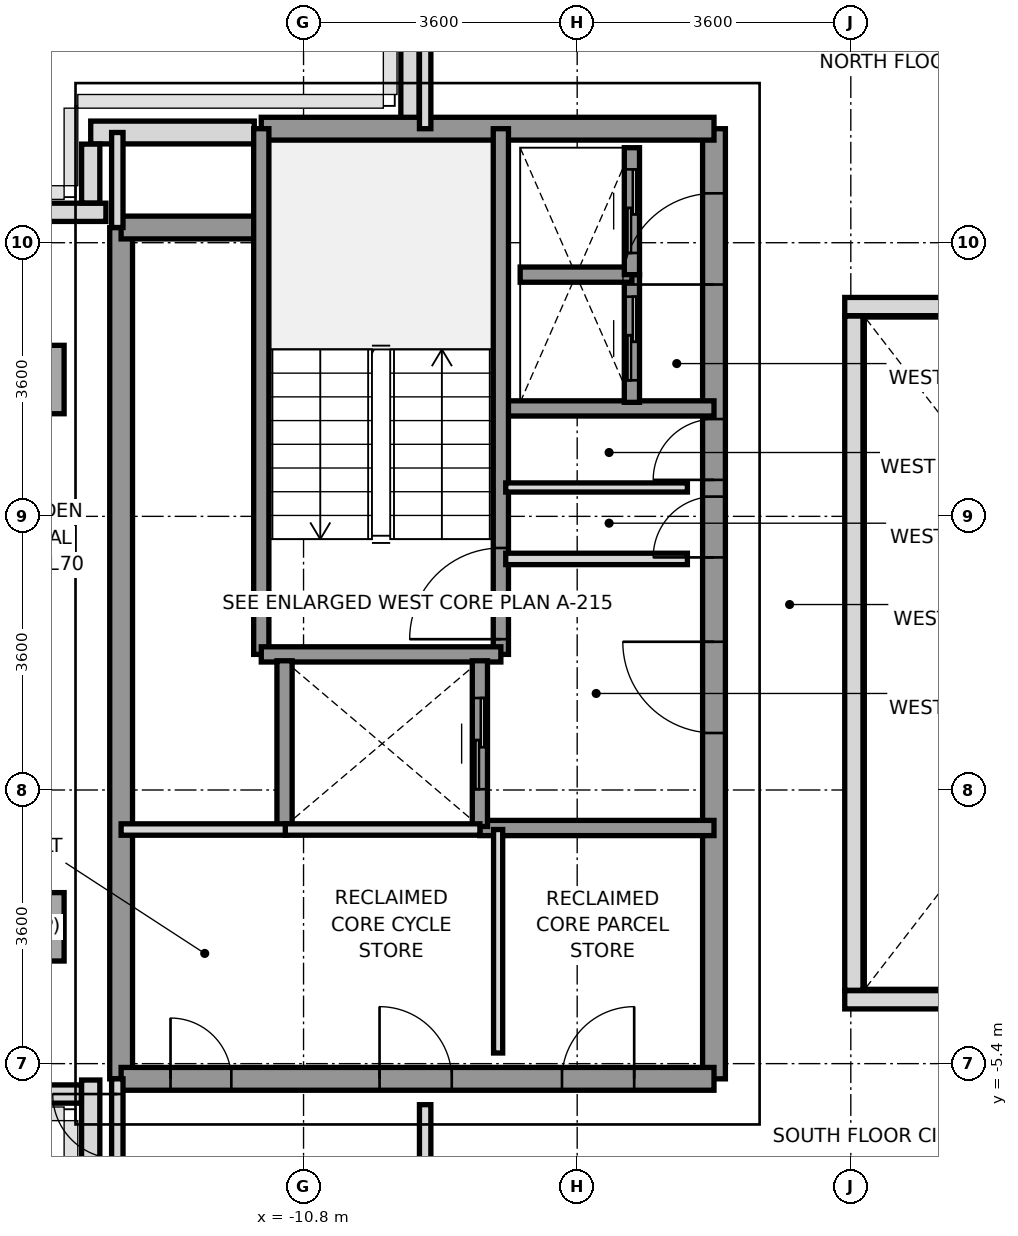
"""IFC4 building model, lengths in metres.
Left out: names, types, materials, properties, quantities, classifications, styles, units other than length and angle.
Written with IfcOpenShell. Run it as: python <this file> out.ifc"""

import sys

from ifc_helpers import new_model, si_unit, direction, frame, frame_2d, origin, origin_2d, place, context, subcontext, project, spatial, rectangle, extrude, source, transform, mapped, element, fill, save


model = new_model("IFC4")
c1 = context("Model", 3, precision=1e-05, world=origin(), true_north=direction((0.0, 1.0)))
c2 = subcontext(c1, "Body", "Model", "MODEL_VIEW")
j1 = project(units=[si_unit("LENGTHUNIT", "METRE"), si_unit("PLANEANGLEUNIT", "RADIAN")], contexts=[c1])
p1 = place(None, origin())
s1 = spatial("IfcSite", under=j1, at=p1, CompositionType="ELEMENT")
p2 = place(p1, origin())
s2 = spatial("IfcBuilding", under=s1, at=p2, CompositionType="ELEMENT")
p3 = place(p2, frame((0.0, 0.0, 252.4)))
s3 = spatial("IfcBuildingStorey", under=s2, at=p3, CompositionType="ELEMENT", Elevation=252.4)
m1 = source(origin(), c2, "Body", "SweptSolid", [
    extrude(rectangle(XDim=0.9, YDim=0.9, at=origin_2d()), origin(), (0.0, 0.0, 1.0), 3.01),
])
for number, where, z_axis, x_axis in (
    (1, (-14.4, -3.6, 0.0), (0.0, 0.0, 1.0), (1.0, 0.0, 0.0)),
    (2, (-14.4, 3.6, 0.0), (0.0, 0.0, 1.0), (1.0, 0.0, 0.0)),
):
    element("IfcColumn", number, at=place(p3, frame(where, z_axis=z_axis, x_axis=x_axis)), inside=s3, PredefinedType="COLUMN", context=c2, shape_type="MappedRepresentation", body=[
        mapped(m1, transform((0.0, 0.0, 0.0), x_axis=(1.0, 0.0, 0.0), y_axis=(0.0, 1.0, 0.0), z_axis=(0.0, 0.0, 1.0), scale=1.0)),
    ])
p4 = place(p3, frame((-13.6, 6.85, 0.0), z_axis=(0.0, 0.0, 1.0), x_axis=(1.0, 0.0, 0.0)))
e3 = element("IfcWall", 3, at=p4, inside=s3, PredefinedType="SOLIDWALL", context=c2, shape_type="SweptSolid", body=[
    extrude(rectangle(XDim=2.152, YDim=0.3, at=frame_2d((1.076, 0.0))), origin(), (0.0, 0.0, 1.0), 3.01),
])
p5 = place(p3, frame((-13.6, -6.877, 0.0), z_axis=(0.0, 0.0, 1.0), x_axis=(0.0, 1.0, 0.0)))
e4 = element("IfcWall", 4, at=p5, inside=s3, PredefinedType="PARAPET", context=c2, shape_type="SweptSolid", body=[
    extrude(rectangle(XDim=1.261, YDim=0.24, at=frame_2d((0.631, 0.0))), origin(), (0.0, 0.0, 1.0), 1.15),
])
p6 = place(p3, frame((-13.723, -5.8, 0.0), z_axis=(0.0, 0.0, 1.0), x_axis=(-1.0, 0.0, 0.0)))
e5 = element("IfcWall", 5, at=p6, inside=s3, PredefinedType="PARAPET", context=c2, shape_type="SweptSolid", body=[
    extrude(rectangle(XDim=1.077, YDim=0.24, at=frame_2d((0.539, 0.0))), origin(), (0.0, 0.0, 1.0), 1.15),
])
p7 = place(p3, frame((-14.677, 5.8, 0.0), z_axis=(0.0, 0.0, 1.0), x_axis=(1.0, 0.0, 0.0)))
e6 = element("IfcWall", 6, at=p7, inside=s3, PredefinedType="PARAPET", context=c2, shape_type="SweptSolid", body=[
    extrude(rectangle(XDim=1.277, YDim=0.24, at=frame_2d((0.639, 0.0))), origin(), (0.0, 0.0, 1.0), 1.15),
])
p8 = place(p3, frame((-13.6, 5.923, 0.0), z_axis=(0.0, 0.0, 1.0), x_axis=(0.0, 1.0, 0.0)))
e7 = element("IfcWall", 7, at=p8, inside=s3, PredefinedType="PARAPET", context=c2, shape_type="SweptSolid", body=[
    extrude(rectangle(XDim=0.774, YDim=0.24, at=frame_2d((0.387, 0.0))), origin(), (0.0, 0.0, 1.0), 1.15),
])
p9 = place(p3, frame((-9.4, 6.953, 0.0), z_axis=(0.0, 0.0, 1.0), x_axis=(0.0, 1.0, 0.0)))
e8 = element("IfcWall", 8, at=p9, inside=s3, PredefinedType="PARAPET", context=c2, shape_type="SweptSolid", body=[
    extrude(rectangle(XDim=1.669, YDim=0.24, at=frame_2d((0.834, 0.0))), origin(), (0.0, 0.0, 1.0), 1.15),
])
p10 = place(p3, frame((-13.2, -5.6, 0.0), z_axis=(0.0, 0.0, 1.0), x_axis=(0.0, 1.0, 0.0)))
e9 = element("IfcWall", 9, at=p10, inside=s3, PredefinedType="SHEAR", context=c2, shape_type="SweptSolid", body=[
    extrude(rectangle(XDim=11.2, YDim=0.3, at=frame_2d((5.6, 0.0))), origin(), (0.0, 0.0, 1.0), 3.01),
])
p11 = place(p3, frame((-5.4, -5.6, 0.0), z_axis=(0.0, 0.0, 1.0), x_axis=(0.0, 1.0, 0.0)))
e10 = element("IfcWall", 10, at=p11, inside=s3, PredefinedType="SHEAR", context=c2, shape_type="SweptSolid", body=[
    extrude(rectangle(XDim=12.5, YDim=0.3, at=frame_2d((6.25, 0.0))), origin(), (0.0, 0.0, 1.0), 3.01),
])
p12 = place(p11, frame((4.55, 0.0, 0.0)))
e11 = element("IfcOpeningElement", 11, at=p12, cuts=e10, PredefinedType="OPENING", context=c2, shape_type="SweptSolid", body=[
    extrude(rectangle(XDim=1.2, YDim=2.2, at=frame_2d((0.6, 1.1))), frame((0.0, 0.16, 0.0), z_axis=(0.0, -1.0, 0.0), x_axis=(1.0, 0.0, 0.0)), (0.0, 0.0, 1.0), 0.32),
])
p13 = place(p11, frame((10.45, 0.0, 0.0)))
e12 = element("IfcOpeningElement", 12, at=p13, cuts=e10, PredefinedType="OPENING", context=c2, shape_type="SweptSolid", body=[
    extrude(rectangle(XDim=1.2, YDim=2.2, at=frame_2d((0.6, 1.1))), frame((0.0, 0.16, 0.0), z_axis=(0.0, -1.0, 0.0), x_axis=(1.0, 0.0, 0.0)), (0.0, 0.0, 1.0), 0.32),
])
p14 = place(p11, frame((6.86, 0.0, 0.0)))
e13 = element("IfcOpeningElement", 13, at=p14, cuts=e10, PredefinedType="OPENING", context=c2, shape_type="SweptSolid", body=[
    extrude(rectangle(XDim=0.8, YDim=2.1, at=frame_2d((0.4, 1.05))), frame((0.0, 0.16, 0.0), z_axis=(0.0, -1.0, 0.0), x_axis=(1.0, 0.0, 0.0)), (0.0, 0.0, 1.0), 0.32),
])
p15 = place(p11, frame((7.88, 0.0, 0.0)))
e14 = element("IfcOpeningElement", 14, at=p15, cuts=e10, PredefinedType="OPENING", context=c2, shape_type="SweptSolid", body=[
    extrude(rectangle(XDim=0.8, YDim=2.1, at=frame_2d((0.4, 1.05))), frame((0.0, 0.16, 0.0), z_axis=(0.0, -1.0, 0.0), x_axis=(1.0, 0.0, 0.0)), (0.0, 0.0, 1.0), 0.32),
])
p16 = place(p3, frame((-11.356, 6.9, 0.0), z_axis=(0.0, 0.0, 1.0), x_axis=(1.0, 0.0, 0.0)))
e15 = element("IfcWall", 15, at=p16, inside=s3, PredefinedType="SHEAR", context=c2, shape_type="SweptSolid", body=[
    extrude(rectangle(XDim=5.956, YDim=0.3, at=frame_2d((2.978, 0.0))), origin(), (0.0, 0.0, 1.0), 3.01),
])
p17 = place(p3, frame((-13.2, 5.6, 0.0), z_axis=(0.0, 0.0, 1.0), x_axis=(1.0, 0.0, 0.0)))
e16 = element("IfcWall", 16, at=p17, inside=s3, PredefinedType="SHEAR", context=c2, shape_type="SweptSolid", body=[
    extrude(rectangle(XDim=1.844, YDim=0.3, at=frame_2d((0.922, 0.0))), origin(), (0.0, 0.0, 1.0), 3.01),
])
p18 = place(p3, frame((-13.2, -5.6, 0.0), z_axis=(0.0, 0.0, 1.0), x_axis=(1.0, 0.0, 0.0)))
e17 = element("IfcWall", 17, at=p18, inside=s3, PredefinedType="SHEAR", context=c2, shape_type="SweptSolid", body=[
    extrude(rectangle(XDim=7.8, YDim=0.3, at=frame_2d((3.9, 0.0))), origin(), (0.0, 0.0, 1.0), 3.01),
])
p19 = place(p18, frame((0.65, 0.0, 0.0)))
e18 = element("IfcOpeningElement", 18, at=p19, cuts=e17, PredefinedType="OPENING", context=c2, shape_type="SweptSolid", body=[
    extrude(rectangle(XDim=0.8, YDim=2.1, at=frame_2d((0.4, 1.05))), frame((0.0, 0.16, 0.0), z_axis=(0.0, -1.0, 0.0), x_axis=(1.0, 0.0, 0.0)), (0.0, 0.0, 1.0), 0.32),
])
p20 = place(p18, frame((3.4, 0.0, 0.0)))
e19 = element("IfcOpeningElement", 19, at=p20, cuts=e17, PredefinedType="OPENING", context=c2, shape_type="SweptSolid", body=[
    extrude(rectangle(XDim=0.95, YDim=2.15, at=frame_2d((0.475, 1.075))), frame((0.0, 0.16, 0.0), z_axis=(0.0, -1.0, 0.0), x_axis=(1.0, 0.0, 0.0)), (0.0, 0.0, 1.0), 0.32),
])
p21 = place(p18, frame((5.8, 0.0, 0.0)))
e20 = element("IfcOpeningElement", 20, at=p21, cuts=e17, PredefinedType="OPENING", context=c2, shape_type="SweptSolid", body=[
    extrude(rectangle(XDim=0.95, YDim=2.15, at=frame_2d((0.475, 1.075))), frame((0.0, 0.16, 0.0), z_axis=(0.0, -1.0, 0.0), x_axis=(1.0, 0.0, 0.0)), (0.0, 0.0, 1.0), 0.32),
])
p22 = place(p3, frame((-8.18, 3.22, 0.0), z_axis=(0.0, 0.0, 1.0), x_axis=(1.0, 0.0, 0.0)))
e21 = element("IfcWall", 21, at=p22, inside=s3, PredefinedType="SOLIDWALL", context=c2, shape_type="SweptSolid", body=[
    extrude(rectangle(XDim=2.78, YDim=0.2, at=frame_2d((1.39, 0.0))), origin(), (0.0, 0.0, 1.0), 3.01),
])
p23 = place(p3, frame((-8.48, -2.3, 0.0), z_axis=(0.0, 0.0, 1.0), x_axis=(1.0, 0.0, 0.0)))
e22 = element("IfcWall", 22, at=p23, inside=s3, PredefinedType="SOLIDWALL", context=c2, shape_type="SweptSolid", body=[
    extrude(rectangle(XDim=3.08, YDim=0.2, at=frame_2d((1.54, 0.0))), origin(), (0.0, 0.0, 1.0), 3.01),
])
p24 = place(p3, frame((-8.204, -0.016, 0.0), z_axis=(0.0, 0.0, 1.0), x_axis=(0.0, 1.0, 0.0)))
e23 = element("IfcWall", 23, at=p24, inside=s3, PredefinedType="SOLIDWALL", context=c2, shape_type="SweptSolid", body=[
    extrude(rectangle(XDim=6.916, YDim=0.2, at=frame_2d((3.458, 0.0))), origin(), (0.0, 0.0, 1.0), 3.01),
])
p25 = place(p24, frame((0.2, 0.0, 0.0)))
e24 = element("IfcOpeningElement", 24, at=p25, cuts=e23, PredefinedType="OPENING", context=c2, shape_type="SweptSolid", body=[
    extrude(rectangle(XDim=1.2, YDim=2.2, at=frame_2d((0.6, 1.1))), frame((0.0, 0.11, 0.0), z_axis=(0.0, -1.0, 0.0), x_axis=(1.0, 0.0, 0.0)), (0.0, 0.0, 1.0), 0.22),
])
p26 = place(p3, frame((-11.356, -0.016, 0.0), z_axis=(0.0, 0.0, 1.0), x_axis=(0.0, 1.0, 0.0)))
e25 = element("IfcWall", 25, at=p26, inside=s3, PredefinedType="SOLIDWALL", context=c2, shape_type="SweptSolid", body=[
    extrude(rectangle(XDim=6.916, YDim=0.2, at=frame_2d((3.458, 0.0))), origin(), (0.0, 0.0, 1.0), 3.01),
])
p27 = place(p3, frame((-11.356, -0.016, 0.0), z_axis=(0.0, 0.0, 1.0), x_axis=(1.0, 0.0, 0.0)))
e26 = element("IfcWall", 26, at=p27, inside=s3, PredefinedType="SOLIDWALL", context=c2, shape_type="SweptSolid", body=[
    extrude(rectangle(XDim=3.152, YDim=0.2, at=frame_2d((1.576, 0.0))), origin(), (0.0, 0.0, 1.0), 3.01),
])
p28 = place(p3, frame((-11.05, -2.28, 0.0), z_axis=(0.0, 0.0, 1.0), x_axis=(0.0, 1.0, 0.0)))
e27 = element("IfcWall", 27, at=p28, inside=s3, PredefinedType="SOLIDWALL", context=c2, shape_type="SweptSolid", body=[
    extrude(rectangle(XDim=2.18, YDim=0.2, at=frame_2d((1.09, 0.0))), origin(), (0.0, 0.0, 1.0), 3.01),
])
p29 = place(p3, frame((-8.48, -2.28, 0.0), z_axis=(0.0, 0.0, 1.0), x_axis=(0.0, 1.0, 0.0)))
e28 = element("IfcWall", 28, at=p29, inside=s3, PredefinedType="SOLIDWALL", context=c2, shape_type="SweptSolid", body=[
    extrude(rectangle(XDim=2.18, YDim=0.2, at=frame_2d((1.09, 0.0))), origin(), (0.0, 0.0, 1.0), 3.01),
])
p30 = place(p29, frame((0.49, 0.0, 0.0)))
e29 = element("IfcOpeningElement", 29, at=p30, cuts=e28, PredefinedType="OPENING", context=c2, shape_type="SweptSolid", body=[
    extrude(rectangle(XDim=1.2, YDim=2.2, at=frame_2d((0.6, 1.1))), frame((0.0, 0.11, 0.0), z_axis=(0.0, -1.0, 0.0), x_axis=(1.0, 0.0, 0.0)), (0.0, 0.0, 1.0), 0.22),
])
p31 = place(p3, frame((-6.48, 3.3, 0.0), z_axis=(0.0, 0.0, 1.0), x_axis=(0.0, 1.0, 0.0)))
e30 = element("IfcWall", 30, at=p31, inside=s3, PredefinedType="SOLIDWALL", context=c2, shape_type="SweptSolid", body=[
    extrude(rectangle(XDim=1.68, YDim=0.2, at=frame_2d((0.84, 0.0))), origin(), (0.0, 0.0, 1.0), 3.01),
])
p32 = place(p31, frame((0.29, 0.0, 0.0)))
e31 = element("IfcOpeningElement", 31, at=p32, cuts=e30, PredefinedType="OPENING", context=c2, shape_type="SweptSolid", body=[
    extrude(rectangle(XDim=1.1, YDim=2.2, at=frame_2d((0.55, 1.1))), frame((0.0, 0.11, 0.0), z_axis=(0.0, -1.0, 0.0), x_axis=(1.0, 0.0, 0.0)), (0.0, 0.0, 1.0), 0.22),
])
p33 = place(p3, frame((-7.95, 4.98, 0.0), z_axis=(0.0, 0.0, 1.0), x_axis=(1.0, 0.0, 0.0)))
e32 = element("IfcWall", 32, at=p33, inside=s3, PredefinedType="SOLIDWALL", context=c2, shape_type="SweptSolid", body=[
    extrude(rectangle(XDim=1.47, YDim=0.2, at=frame_2d((0.735, 0.0))), origin(), (0.0, 0.0, 1.0), 3.01),
])
p34 = place(p3, frame((-6.48, 4.98, 0.0), z_axis=(0.0, 0.0, 1.0), x_axis=(0.0, 1.0, 0.0)))
e33 = element("IfcWall", 33, at=p34, inside=s3, PredefinedType="SOLIDWALL", context=c2, shape_type="SweptSolid", body=[
    extrude(rectangle(XDim=1.67, YDim=0.2, at=frame_2d((0.835, 0.0))), origin(), (0.0, 0.0, 1.0), 3.01),
])
p35 = place(p34, frame((0.285, 0.0, 0.0)))
e34 = element("IfcOpeningElement", 34, at=p35, cuts=e33, PredefinedType="OPENING", context=c2, shape_type="SweptSolid", body=[
    extrude(rectangle(XDim=1.1, YDim=2.2, at=frame_2d((0.55, 1.1))), frame((0.0, 0.11, 0.0), z_axis=(0.0, -1.0, 0.0), x_axis=(1.0, 0.0, 0.0)), (0.0, 0.0, 1.0), 0.22),
])
p36 = place(p3, frame((-8.14, 1.24, 0.0), z_axis=(0.0, 0.0, 1.0), x_axis=(1.0, 0.0, 0.0)))
e35 = element("IfcWall", 35, at=p36, inside=s3, PredefinedType="PARTITIONING", context=c2, shape_type="SweptSolid", body=[
    extrude(rectangle(XDim=2.39, YDim=0.15, at=frame_2d((1.195, 0.0))), origin(), (0.0, 0.0, 1.0), 3.01),
])
p37 = place(p3, frame((-8.14, 2.18, 0.0), z_axis=(0.0, 0.0, 1.0), x_axis=(1.0, 0.0, 0.0)))
e36 = element("IfcWall", 36, at=p37, inside=s3, PredefinedType="PARTITIONING", context=c2, shape_type="SweptSolid", body=[
    extrude(rectangle(XDim=2.39, YDim=0.12, at=frame_2d((1.195, 0.0))), origin(), (0.0, 0.0, 1.0), 3.01),
])
p38 = place(p3, frame((-13.2, -2.32, 0.0), z_axis=(0.0, 0.0, 1.0), x_axis=(1.0, 0.0, 0.0)))
e37 = element("IfcWall", 37, at=p38, inside=s3, PredefinedType="PARTITIONING", context=c2, shape_type="SweptSolid", body=[
    extrude(rectangle(XDim=2.18, YDim=0.15, at=frame_2d((1.09, 0.0))), origin(), (0.0, 0.0, 1.0), 3.01),
])
p39 = place(p3, frame((-8.24, -5.26, 0.0), z_axis=(0.0, 0.0, 1.0), x_axis=(0.0, 1.0, 0.0)))
e38 = element("IfcWall", 38, at=p39, inside=s3, PredefinedType="PARTITIONING", context=c2, shape_type="SweptSolid", body=[
    extrude(rectangle(XDim=2.94, YDim=0.12, at=frame_2d((1.47, 0.0))), origin(), (0.0, 0.0, 1.0), 3.01),
])
p40 = place(p3, frame((-11.04, -2.32, 0.0), z_axis=(0.0, 0.0, 1.0), x_axis=(1.0, 0.0, 0.0)))
e39 = element("IfcWall", 39, at=p40, inside=s3, PredefinedType="PARTITIONING", context=c2, shape_type="SweptSolid", body=[
    extrude(rectangle(XDim=2.56, YDim=0.15, at=frame_2d((1.28, 0.0))), origin(), (0.0, 0.0, 1.0), 3.01),
])
p41 = place(p3, frame((-9.2, 6.9, 0.0), z_axis=(0.0, 0.0, 1.0), x_axis=(0.0, 1.0, 0.0)))
e40 = element("IfcWall", 40, at=p41, inside=s3, PredefinedType="PARTITIONING", context=c2, shape_type="SweptSolid", body=[
    extrude(rectangle(XDim=3.38, YDim=0.15, at=frame_2d((1.69, 0.0))), origin(), (0.0, 0.0, 1.0), 2.61),
])
p42 = place(p3, frame((-9.2, -10.28, 0.0), z_axis=(0.0, 0.0, 1.0), x_axis=(0.0, 1.0, 0.0)))
e41 = element("IfcWall", 41, at=p42, inside=s3, PredefinedType="PARTITIONING", context=c2, shape_type="SweptSolid", body=[
    extrude(rectangle(XDim=4.34, YDim=0.15, at=frame_2d((2.17, 0.0))), origin(), (0.0, 0.0, 1.0), 2.61),
])
p43 = place(p3, frame((-13.25, 5.6, 0.0), z_axis=(0.0, 0.0, 1.0), x_axis=(0.0, 1.0, 0.0)))
e42 = element("IfcWall", 42, at=p43, inside=s3, PredefinedType="PARTITIONING", context=c2, shape_type="SweptSolid", body=[
    extrude(rectangle(XDim=1.25, YDim=0.15, at=frame_2d((0.625, 0.0))), origin(), (0.0, 0.0, 1.0), 3.01),
])
p44 = place(p3, frame((-13.25, -6.85, 0.0), z_axis=(0.0, 0.0, 1.0), x_axis=(0.0, 1.0, 0.0)))
e43 = element("IfcWall", 43, at=p44, inside=s3, PredefinedType="PARTITIONING", context=c2, shape_type="SweptSolid", body=[
    extrude(rectangle(XDim=1.25, YDim=0.15, at=frame_2d((0.625, 0.0))), origin(), (0.0, 0.0, 1.0), 3.01),
])
p45 = place(p44, frame((0.2, 0.0, 0.0)))
e44 = element("IfcOpeningElement", 44, at=p45, cuts=e43, PredefinedType="OPENING", context=c2, shape_type="SweptSolid", body=[
    extrude(rectangle(XDim=0.85, YDim=2.1, at=frame_2d((0.425, 1.05))), frame((0.0, 0.085, 0.0), z_axis=(0.0, -1.0, 0.0), x_axis=(1.0, 0.0, 0.0)), (0.0, 0.0, 1.0), 0.17),
])
for number, where, z_axis, x_axis in (
    (45, (-3.68, -4.56, 0.0), (0.0, 0.0, 1.0), (1.0, 0.0, 0.0)),
    (46, (-3.68, 4.56, 0.0), (0.0, 0.0, 1.0), (1.0, 0.0, 0.0)),
):
    element("IfcWall", number, at=place(p3, frame(where, z_axis=z_axis, x_axis=x_axis)), inside=s3, PredefinedType="PARAPET", context=c2, shape_type="SweptSolid", body=[
        extrude(rectangle(XDim=7.36, YDim=0.24, at=frame_2d((3.68, 0.0))), origin(), (0.0, 0.0, 1.0), 1.15),
    ])
p46 = place(p3, frame((-3.56, -4.435, 0.0), z_axis=(0.0, 0.0, 1.0), x_axis=(0.0, 1.0, 0.0)))
e47 = element("IfcWall", 47, at=p46, inside=s3, PredefinedType="PARAPET", context=c2, shape_type="SweptSolid", body=[
    extrude(rectangle(XDim=8.87, YDim=0.24, at=frame_2d((4.435, 0.0))), origin(), (0.0, 0.0, 1.0), 1.15),
])
m2 = source(origin(), c2, "Body", "SweptSolid", [
    extrude(rectangle(XDim=1.2, YDim=2.2, at=frame_2d((0.6, 1.1))), frame((0.0, 0.025, 0.0), z_axis=(0.0, -1.0, 0.0), x_axis=(1.0, 0.0, 0.0)), (0.0, 0.0, 1.0), 0.05),
])
p47 = place(p25, origin())
e48 = element("IfcDoor", 48, at=p47, inside=s3, OperationType="SINGLE_SWING_LEFT", PredefinedType="DOOR", context=c2, shape_type="MappedRepresentation", body=[
    mapped(m2, transform((0.0, 0.0, 0.0), x_axis=(1.0, 0.0, 0.0), y_axis=(0.0, 1.0, 0.0), z_axis=(0.0, 0.0, 1.0), scale=1.0)),
])
fill(e24, e48)
p48 = place(p12, origin())
e49 = element("IfcDoor", 49, at=p48, inside=s3, OperationType="SINGLE_SWING_RIGHT", PredefinedType="DOOR", context=c2, shape_type="MappedRepresentation", body=[
    mapped(m2, transform((0.0, 0.0, 0.0), x_axis=(1.0, 0.0, 0.0), y_axis=(0.0, 1.0, 0.0), z_axis=(0.0, 0.0, 1.0), scale=1.0)),
])
fill(e11, e49)
p49 = place(p13, origin())
e50 = element("IfcDoor", 50, at=p49, inside=s3, OperationType="SINGLE_SWING_LEFT", PredefinedType="DOOR", context=c2, shape_type="MappedRepresentation", body=[
    mapped(m2, transform((0.0, 0.0, 0.0), x_axis=(1.0, 0.0, 0.0), y_axis=(0.0, 1.0, 0.0), z_axis=(0.0, 0.0, 1.0), scale=1.0)),
])
fill(e12, e50)
m3 = source(origin(), c2, "Body", "SweptSolid", [
    extrude(rectangle(XDim=0.8, YDim=2.1, at=frame_2d((0.4, 1.05))), frame((0.0, 0.025, 0.0), z_axis=(0.0, -1.0, 0.0), x_axis=(1.0, 0.0, 0.0)), (0.0, 0.0, 1.0), 0.05),
])
p50 = place(p14, origin())
e51 = element("IfcDoor", 51, at=p50, inside=s3, OperationType="SINGLE_SWING_LEFT", PredefinedType="DOOR", context=c2, shape_type="MappedRepresentation", body=[
    mapped(m3, transform((0.0, 0.0, 0.0), x_axis=(1.0, 0.0, 0.0), y_axis=(0.0, 1.0, 0.0), z_axis=(0.0, 0.0, 1.0), scale=1.0)),
])
fill(e13, e51)
p51 = place(p15, origin())
e52 = element("IfcDoor", 52, at=p51, inside=s3, OperationType="SINGLE_SWING_LEFT", PredefinedType="DOOR", context=c2, shape_type="MappedRepresentation", body=[
    mapped(m3, transform((0.0, 0.0, 0.0), x_axis=(1.0, 0.0, 0.0), y_axis=(0.0, 1.0, 0.0), z_axis=(0.0, 0.0, 1.0), scale=1.0)),
])
fill(e14, e52)
p52 = place(p19, origin())
e53 = element("IfcDoor", 53, at=p52, inside=s3, OperationType="SINGLE_SWING_LEFT", PredefinedType="DOOR", context=c2, shape_type="MappedRepresentation", body=[
    mapped(m3, transform((0.0, 0.0, 0.0), x_axis=(1.0, 0.0, 0.0), y_axis=(0.0, 1.0, 0.0), z_axis=(0.0, 0.0, 1.0), scale=1.0)),
])
fill(e18, e53)
m4 = source(origin(), c2, "Body", "SweptSolid", [
    extrude(rectangle(XDim=0.95, YDim=2.15, at=frame_2d((0.475, 1.075))), frame((0.0, 0.025, 0.0), z_axis=(0.0, -1.0, 0.0), x_axis=(1.0, 0.0, 0.0)), (0.0, 0.0, 1.0), 0.05),
])
p53 = place(p20, origin())
e54 = element("IfcDoor", 54, at=p53, inside=s3, OperationType="SINGLE_SWING_LEFT", PredefinedType="DOOR", context=c2, shape_type="MappedRepresentation", body=[
    mapped(m4, transform((0.0, 0.0, 0.0), x_axis=(1.0, 0.0, 0.0), y_axis=(0.0, 1.0, 0.0), z_axis=(0.0, 0.0, 1.0), scale=1.0)),
])
fill(e19, e54)
p54 = place(p21, origin())
e55 = element("IfcDoor", 55, at=p54, inside=s3, OperationType="SINGLE_SWING_RIGHT", PredefinedType="DOOR", context=c2, shape_type="MappedRepresentation", body=[
    mapped(m4, transform((0.0, 0.0, 0.0), x_axis=(1.0, 0.0, 0.0), y_axis=(0.0, 1.0, 0.0), z_axis=(0.0, 0.0, 1.0), scale=1.0)),
])
fill(e20, e55)
p55 = place(p30, origin())
e56 = element("IfcDoor", 56, at=p55, inside=s3, OperationType="SLIDING_TO_RIGHT", PredefinedType="DOOR", context=c2, shape_type="MappedRepresentation", body=[
    mapped(m2, transform((0.0, 0.0, 0.0), x_axis=(1.0, 0.0, 0.0), y_axis=(0.0, 1.0, 0.0), z_axis=(0.0, 0.0, 1.0), scale=1.0)),
])
fill(e29, e56)
m5 = source(origin(), c2, "Body", "SweptSolid", [
    extrude(rectangle(XDim=1.1, YDim=2.2, at=frame_2d((0.55, 1.1))), frame((0.0, 0.025, 0.0), z_axis=(0.0, -1.0, 0.0), x_axis=(1.0, 0.0, 0.0)), (0.0, 0.0, 1.0), 0.05),
])
p56 = place(p32, origin())
e57 = element("IfcDoor", 57, at=p56, inside=s3, OperationType="SLIDING_TO_LEFT", PredefinedType="DOOR", context=c2, shape_type="MappedRepresentation", body=[
    mapped(m5, transform((0.0, 0.0, 0.0), x_axis=(1.0, 0.0, 0.0), y_axis=(0.0, 1.0, 0.0), z_axis=(0.0, 0.0, 1.0), scale=1.0)),
])
fill(e31, e57)
p57 = place(p35, origin())
e58 = element("IfcDoor", 58, at=p57, inside=s3, OperationType="SLIDING_TO_LEFT", PredefinedType="DOOR", context=c2, shape_type="MappedRepresentation", body=[
    mapped(m5, transform((0.0, 0.0, 0.0), x_axis=(1.0, 0.0, 0.0), y_axis=(0.0, 1.0, 0.0), z_axis=(0.0, 0.0, 1.0), scale=1.0)),
])
fill(e34, e58)
m6 = source(origin(), c2, "Body", "SweptSolid", [
    extrude(rectangle(XDim=0.85, YDim=2.1, at=frame_2d((0.425, 1.05))), frame((0.0, 0.025, 0.0), z_axis=(0.0, -1.0, 0.0), x_axis=(1.0, 0.0, 0.0)), (0.0, 0.0, 1.0), 0.05),
])
p58 = place(p45, origin())
e59 = element("IfcDoor", 59, at=p58, inside=s3, OperationType="SINGLE_SWING_RIGHT", PredefinedType="DOOR", context=c2, shape_type="MappedRepresentation", body=[
    mapped(m6, transform((0.0, 0.0, 0.0), x_axis=(1.0, 0.0, 0.0), y_axis=(0.0, 1.0, 0.0), z_axis=(0.0, 0.0, 1.0), scale=1.0)),
])
fill(e44, e59)
save(model, sys.argv[1])
